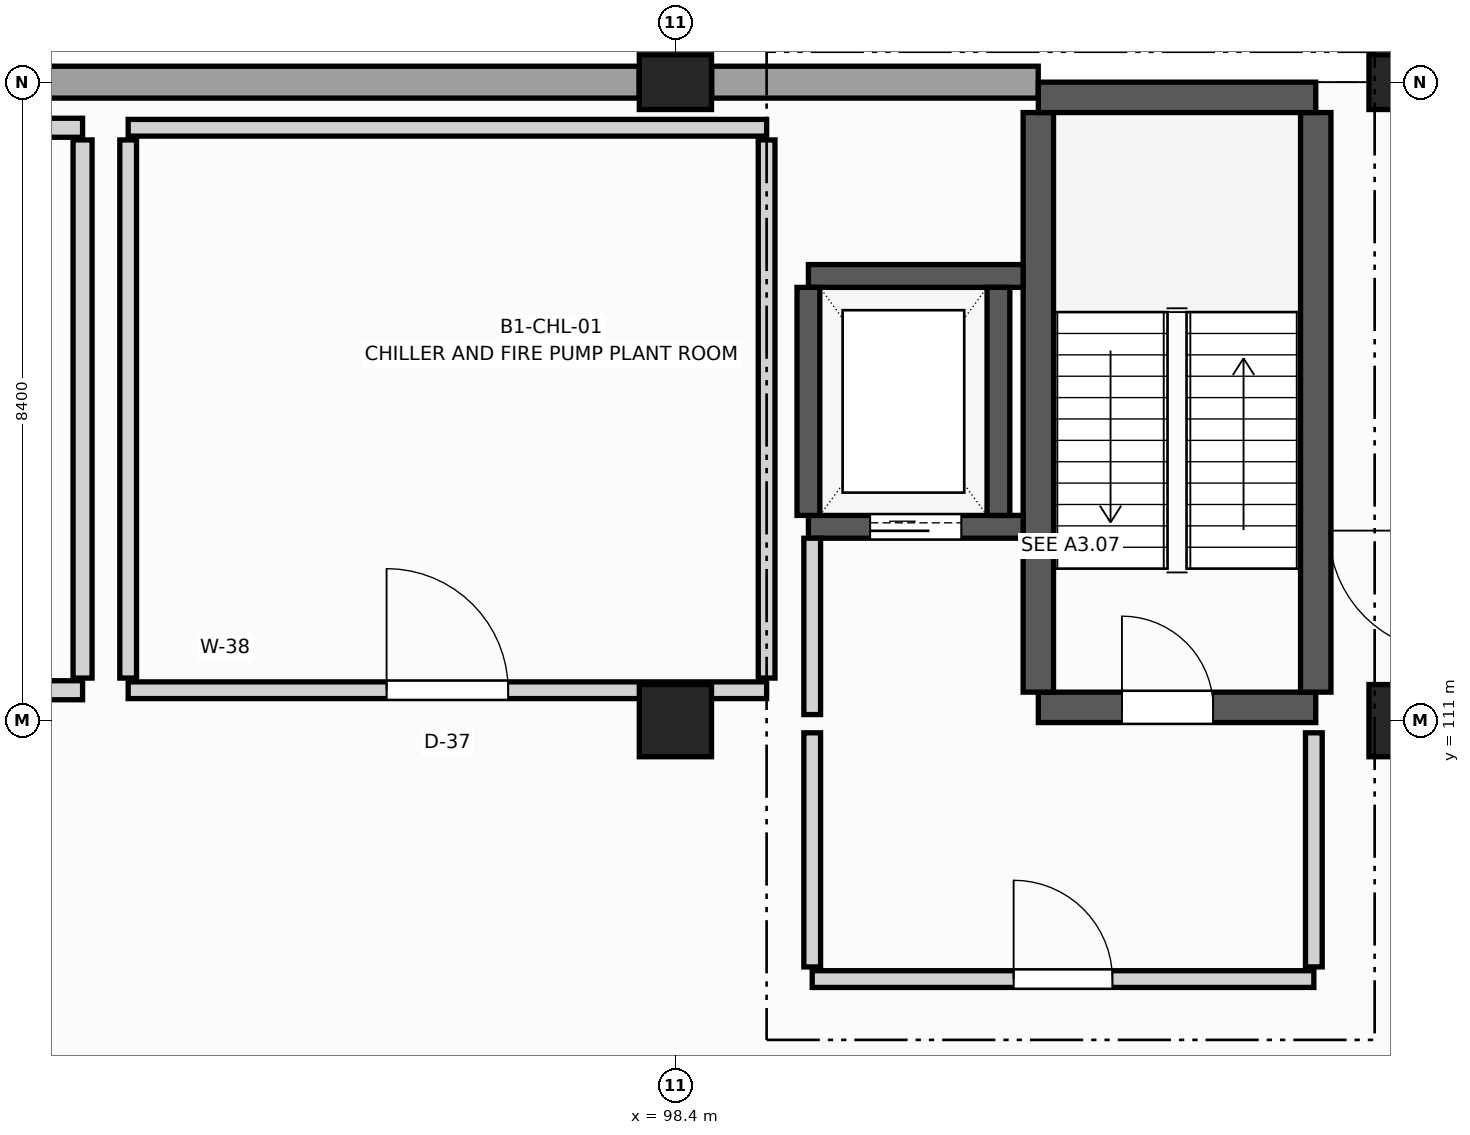
"""IFC4 building model, lengths in metres.
Left out: names, types, materials, properties, quantities, classifications, styles, units other than length and angle.
Written with IfcOpenShell. Run it as: python <this file> out.ifc"""

import sys

from ifc_helpers import new_model, si_unit, direction, frame, frame_2d, origin, origin_2d, place, context, subcontext, project, spatial, rectangle, extrude, element, fill, save


model = new_model("IFC4")
c1 = context("Model", 3, precision=1e-05, world=origin(), true_north=direction((0.0, 1.0)))
c2 = subcontext(c1, "Body", "Model", "MODEL_VIEW")
j1 = project(units=[si_unit("LENGTHUNIT", "METRE"), si_unit("PLANEANGLEUNIT", "RADIAN")], contexts=[c1])
p1 = place(None, origin())
s1 = spatial("IfcSite", under=j1, at=p1, CompositionType="ELEMENT")
p2 = place(p1, origin())
s2 = spatial("IfcBuilding", under=s1, at=p2, CompositionType="ELEMENT")
p3 = place(p2, frame((0.0, 0.0, -4.5)))
s3 = spatial("IfcBuildingStorey", under=s2, at=p3, CompositionType="ELEMENT", Elevation=-4.5)
p4 = place(p3, frame((98.4, 111.0, 0.0), z_axis=(0.0, 0.0, 1.0), x_axis=(1.0, 0.0, 0.0)))
e1 = element("IfcColumn", 1, at=p4, inside=s3, PredefinedType="COLUMN", context=c2, shape_type="SweptSolid", body=[
    extrude(rectangle(XDim=0.95, YDim=0.95, at=origin_2d()), origin(), (0.0, 0.0, 1.0), 4.14),
])
p5 = place(p3, frame((98.4, 119.4, 0.0), z_axis=(0.0, 0.0, 1.0), x_axis=(1.0, 0.0, 0.0)))
e2 = element("IfcColumn", 2, at=p5, inside=s3, PredefinedType="COLUMN", context=c2, shape_type="SweptSolid", body=[
    extrude(rectangle(XDim=0.95, YDim=0.72, at=origin_2d()), origin(), (0.0, 0.0, 1.0), 4.14),
])
p6 = place(p3, frame((108.0, 111.0, 0.0), z_axis=(0.0, 0.0, 1.0), x_axis=(1.0, 0.0, 0.0)))
e3 = element("IfcColumn", 3, at=p6, inside=s3, PredefinedType="COLUMN", context=c2, shape_type="SweptSolid", body=[
    extrude(rectangle(XDim=0.95, YDim=0.95, at=origin_2d()), origin(), (0.0, 0.0, 1.0), 4.14),
])
p7 = place(p3, frame((108.0, 119.4, 0.0), z_axis=(0.0, 0.0, 1.0), x_axis=(1.0, 0.0, 0.0)))
e4 = element("IfcColumn", 4, at=p7, inside=s3, PredefinedType="COLUMN", context=c2, shape_type="SweptSolid", body=[
    extrude(rectangle(XDim=0.95, YDim=0.72, at=origin_2d()), origin(), (0.0, 0.0, 1.0), 4.14),
])
p8 = place(p3, frame((89.277, 119.4, 0.0), z_axis=(0.0, 0.0, 1.0), x_axis=(1.0, 0.0, 0.0)))
e5 = element("IfcWall", 5, at=p8, inside=s3, PredefinedType="SOLIDWALL", context=c2, shape_type="SweptSolid", body=[
    extrude(rectangle(XDim=8.646, YDim=0.42, at=frame_2d((4.323, 0.0))), origin(), (0.0, 0.0, 1.0), 4.135),
])
p9 = place(p3, frame((98.877, 119.4, 0.0), z_axis=(0.0, 0.0, 1.0), x_axis=(1.0, 0.0, 0.0)))
e6 = element("IfcWall", 6, at=p9, inside=s3, PredefinedType="SOLIDWALL", context=c2, shape_type="SweptSolid", body=[
    extrude(rectangle(XDim=4.297, YDim=0.42, at=frame_2d((2.148, 0.0))), origin(), (0.0, 0.0, 1.0), 4.135),
])
p10 = place(p3, frame((103.175, 111.175, 0.0), z_axis=(0.0, 0.0, 1.0), x_axis=(1.0, 0.0, 0.0)))
e7 = element("IfcWall", 7, at=p10, inside=s3, PredefinedType="SHEAR", context=c2, shape_type="SweptSolid", body=[
    extrude(rectangle(XDim=3.65, YDim=0.4, at=frame_2d((1.825, 0.0))), origin(), (0.0, 0.0, 1.0), 4.14),
])
p11 = place(p10, frame((1.1, 0.0, 0.0)))
e8 = element("IfcOpeningElement", 8, at=p11, cuts=e7, PredefinedType="OPENING", context=c2, shape_type="SweptSolid", body=[
    extrude(rectangle(XDim=1.2, YDim=2.2, at=frame_2d((0.6, 1.1))), frame((0.0, 0.21, 0.0), z_axis=(0.0, -1.0, 0.0), x_axis=(1.0, 0.0, 0.0)), (0.0, 0.0, 1.0), 0.42),
])
for number, where, z_axis, x_axis in (
    (9, (103.175, 111.375, 0.0), (0.0, 0.0, 1.0), (0.0, 1.0, 0.0)),
    (10, (106.825, 111.375, 0.0), (0.0, 0.0, 1.0), (0.0, 1.0, 0.0)),
):
    element("IfcWall", number, at=place(p3, frame(where, z_axis=z_axis, x_axis=x_axis)), inside=s3, PredefinedType="SHEAR", context=c2, shape_type="SweptSolid", body=[
        extrude(rectangle(XDim=7.625, YDim=0.4, at=frame_2d((3.812, 0.0))), origin(), (0.0, 0.0, 1.0), 4.14),
    ])
p12 = place(p3, frame((103.175, 119.2, 0.0), z_axis=(0.0, 0.0, 1.0), x_axis=(1.0, 0.0, 0.0)))
e11 = element("IfcWall", 11, at=p12, inside=s3, PredefinedType="SHEAR", context=c2, shape_type="SweptSolid", body=[
    extrude(rectangle(XDim=3.65, YDim=0.4, at=frame_2d((1.825, 0.0))), origin(), (0.0, 0.0, 1.0), 4.14),
])
p13 = place(p3, frame((100.15, 113.55, 0.0), z_axis=(0.0, 0.0, 1.0), x_axis=(1.0, 0.0, 0.0)))
e12 = element("IfcWall", 12, at=p13, inside=s3, PredefinedType="SHEAR", context=c2, shape_type="SweptSolid", body=[
    extrude(rectangle(XDim=2.825, YDim=0.3, at=frame_2d((1.413, 0.0))), origin(), (0.0, 0.0, 1.0), 4.14),
])
p14 = place(p13, frame((0.812, 0.0, 0.0)))
e13 = element("IfcOpeningElement", 13, at=p14, cuts=e12, PredefinedType="OPENING", context=c2, shape_type="SweptSolid", body=[
    extrude(rectangle(XDim=1.2, YDim=2.2, at=frame_2d((0.6, 1.1))), frame((0.0, 0.16, 0.0), z_axis=(0.0, -1.0, 0.0), x_axis=(1.0, 0.0, 0.0)), (0.0, 0.0, 1.0), 0.32),
])
p15 = place(p3, frame((100.15, 116.85, 0.0), z_axis=(0.0, 0.0, 1.0), x_axis=(1.0, 0.0, 0.0)))
e14 = element("IfcWall", 14, at=p15, inside=s3, PredefinedType="SHEAR", context=c2, shape_type="SweptSolid", body=[
    extrude(rectangle(XDim=2.825, YDim=0.3, at=frame_2d((1.413, 0.0))), origin(), (0.0, 0.0, 1.0), 4.14),
])
for number, where, z_axis, x_axis in (
    (15, (100.15, 113.7, 0.0), (0.0, 0.0, 1.0), (0.0, 1.0, 0.0)),
    (16, (102.65, 113.7, 0.0), (0.0, 0.0, 1.0), (0.0, 1.0, 0.0)),
):
    element("IfcWall", number, at=place(p3, frame(where, z_axis=z_axis, x_axis=x_axis)), inside=s3, PredefinedType="SHEAR", context=c2, shape_type="SweptSolid", body=[
        extrude(rectangle(XDim=3.0, YDim=0.3, at=frame_2d((1.5, 0.0))), origin(), (0.0, 0.0, 1.0), 4.14),
    ])
p16 = place(p3, frame((100.2, 107.6, 0.0), z_axis=(0.0, 0.0, 1.0), x_axis=(1.0, 0.0, 0.0)))
e17 = element("IfcWall", 17, at=p16, inside=s3, PredefinedType="PARTITIONING", context=c2, shape_type="SweptSolid", body=[
    extrude(rectangle(XDim=6.6, YDim=0.22, at=frame_2d((3.3, 0.0))), origin(), (0.0, 0.0, 1.0), 3.22),
])
p17 = place(p16, frame((2.65, 0.0, 0.0)))
e18 = element("IfcOpeningElement", 18, at=p17, cuts=e17, PredefinedType="OPENING", context=c2, shape_type="SweptSolid", body=[
    extrude(rectangle(XDim=1.3, YDim=2.2, at=frame_2d((0.65, 1.1))), frame((0.0, 0.12, 0.0), z_axis=(0.0, -1.0, 0.0), x_axis=(1.0, 0.0, 0.0)), (0.0, 0.0, 1.0), 0.24),
])
p18 = place(p3, frame((100.2, 111.08, 0.0), z_axis=(0.0, 0.0, 1.0), x_axis=(0.0, 1.0, 0.0)))
e19 = element("IfcWall", 19, at=p18, inside=s3, PredefinedType="PARTITIONING", context=c2, shape_type="SweptSolid", body=[
    extrude(rectangle(XDim=2.32, YDim=0.22, at=frame_2d((1.16, 0.0))), origin(), (0.0, 0.0, 1.0), 3.22),
])
for number, where, z_axis, x_axis in (
    (20, (100.2, 107.76, 0.0), (0.0, 0.0, 1.0), (0.0, 1.0, 0.0)),
    (21, (106.8, 107.76, 0.0), (0.0, 0.0, 1.0), (0.0, 1.0, 0.0)),
):
    element("IfcWall", number, at=place(p3, frame(where, z_axis=z_axis, x_axis=x_axis)), inside=s3, PredefinedType="PARTITIONING", context=c2, shape_type="SweptSolid", body=[
        extrude(rectangle(XDim=3.08, YDim=0.22, at=frame_2d((1.54, 0.0))), origin(), (0.0, 0.0, 1.0), 3.22),
    ])
p19 = place(p3, frame((78.2, 111.4, 0.0), z_axis=(0.0, 0.0, 1.0), x_axis=(1.0, 0.0, 0.0)))
e22 = element("IfcWall", 22, at=p19, inside=s3, PredefinedType="PARTITIONING", context=c2, shape_type="SweptSolid", body=[
    extrude(rectangle(XDim=12.4, YDim=0.25, at=frame_2d((6.2, 0.0))), origin(), (0.0, 0.0, 1.0), 3.22),
])
p20 = place(p19, frame((5.4, 0.0, 0.0)))
e23 = element("IfcOpeningElement", 23, at=p20, cuts=e22, PredefinedType="OPENING", context=c2, shape_type="SweptSolid", body=[
    extrude(rectangle(XDim=1.6, YDim=2.3, at=frame_2d((0.8, 1.15))), frame((0.0, 0.135, 0.0), z_axis=(0.0, -1.0, 0.0), x_axis=(1.0, 0.0, 0.0)), (0.0, 0.0, 1.0), 0.27),
])
p21 = place(p3, frame((78.2, 118.8, 0.0), z_axis=(0.0, 0.0, 1.0), x_axis=(1.0, 0.0, 0.0)))
e24 = element("IfcWall", 24, at=p21, inside=s3, PredefinedType="PARTITIONING", context=c2, shape_type="SweptSolid", body=[
    extrude(rectangle(XDim=12.4, YDim=0.25, at=frame_2d((6.2, 0.0))), origin(), (0.0, 0.0, 1.0), 3.22),
])
p22 = place(p3, frame((90.6, 111.56, 0.0), z_axis=(0.0, 0.0, 1.0), x_axis=(0.0, 1.0, 0.0)))
e25 = element("IfcWall", 25, at=p22, inside=s3, PredefinedType="PARTITIONING", context=c2, shape_type="SweptSolid", body=[
    extrude(rectangle(XDim=7.08, YDim=0.25, at=frame_2d((3.54, 0.0))), origin(), (0.0, 0.0, 1.0), 3.22),
])
p23 = place(p3, frame((91.2, 111.4, 0.0), z_axis=(0.0, 0.0, 1.0), x_axis=(1.0, 0.0, 0.0)))
e26 = element("IfcWall", 26, at=p23, inside=s3, PredefinedType="PARTITIONING", context=c2, shape_type="SweptSolid", body=[
    extrude(rectangle(XDim=8.4, YDim=0.22, at=frame_2d((4.2, 0.0))), origin(), (0.0, 0.0, 1.0), 3.22),
])
p24 = place(p23, frame((3.4, 0.0, 0.0)))
e27 = element("IfcOpeningElement", 27, at=p24, cuts=e26, PredefinedType="OPENING", context=c2, shape_type="SweptSolid", body=[
    extrude(rectangle(XDim=1.6, YDim=2.3, at=frame_2d((0.8, 1.15))), frame((0.0, 0.12, 0.0), z_axis=(0.0, -1.0, 0.0), x_axis=(1.0, 0.0, 0.0)), (0.0, 0.0, 1.0), 0.24),
])
p25 = place(p3, frame((91.2, 118.8, 0.0), z_axis=(0.0, 0.0, 1.0), x_axis=(1.0, 0.0, 0.0)))
e28 = element("IfcWall", 28, at=p25, inside=s3, PredefinedType="PARTITIONING", context=c2, shape_type="SweptSolid", body=[
    extrude(rectangle(XDim=8.4, YDim=0.22, at=frame_2d((4.2, 0.0))), origin(), (0.0, 0.0, 1.0), 3.22),
])
for number, where, z_axis, x_axis in (
    (29, (91.2, 111.56, 0.0), (0.0, 0.0, 1.0), (0.0, 1.0, 0.0)),
    (30, (99.6, 111.56, 0.0), (0.0, 0.0, 1.0), (0.0, 1.0, 0.0)),
):
    element("IfcWall", number, at=place(p3, frame(where, z_axis=z_axis, x_axis=x_axis)), inside=s3, PredefinedType="PARTITIONING", context=c2, shape_type="SweptSolid", body=[
        extrude(rectangle(XDim=7.08, YDim=0.22, at=frame_2d((3.54, 0.0))), origin(), (0.0, 0.0, 1.0), 3.22),
    ])
p26 = place(p11, origin())
e31 = element("IfcDoor", 31, at=p26, inside=s3, OperationType="SINGLE_SWING_LEFT", PredefinedType="DOOR", context=c2, shape_type="SweptSolid", body=[
    extrude(rectangle(XDim=1.2, YDim=2.2, at=frame_2d((0.6, 1.1))), frame((0.0, 0.025, 0.0), z_axis=(0.0, -1.0, 0.0), x_axis=(1.0, 0.0, 0.0)), (0.0, 0.0, 1.0), 0.05),
])
fill(e8, e31)
p27 = place(p14, origin())
e32 = element("IfcDoor", 32, at=p27, inside=s3, OperationType="SLIDING_TO_LEFT", PredefinedType="DOOR", context=c2, shape_type="SweptSolid", body=[
    extrude(rectangle(XDim=1.2, YDim=2.2, at=frame_2d((0.6, 1.1))), frame((0.0, 0.025, 0.0), z_axis=(0.0, -1.0, 0.0), x_axis=(1.0, 0.0, 0.0)), (0.0, 0.0, 1.0), 0.05),
])
fill(e13, e32)
p28 = place(p17, origin())
e33 = element("IfcDoor", 33, at=p28, inside=s3, OperationType="SINGLE_SWING_LEFT", PredefinedType="DOOR", context=c2, shape_type="SweptSolid", body=[
    extrude(rectangle(XDim=1.3, YDim=2.2, at=frame_2d((0.65, 1.1))), frame((0.0, 0.025, 0.0), z_axis=(0.0, -1.0, 0.0), x_axis=(1.0, 0.0, 0.0)), (0.0, 0.0, 1.0), 0.05),
])
fill(e18, e33)
p29 = place(p24, origin())
e34 = element("IfcDoor", 34, at=p29, inside=s3, OperationType="SINGLE_SWING_LEFT", PredefinedType="DOOR", context=c2, shape_type="SweptSolid", body=[
    extrude(rectangle(XDim=1.6, YDim=2.3, at=frame_2d((0.8, 1.15))), frame((0.0, 0.025, 0.0), z_axis=(0.0, -1.0, 0.0), x_axis=(1.0, 0.0, 0.0)), (0.0, 0.0, 1.0), 0.05),
])
fill(e27, e34)
save(model, sys.argv[1])
